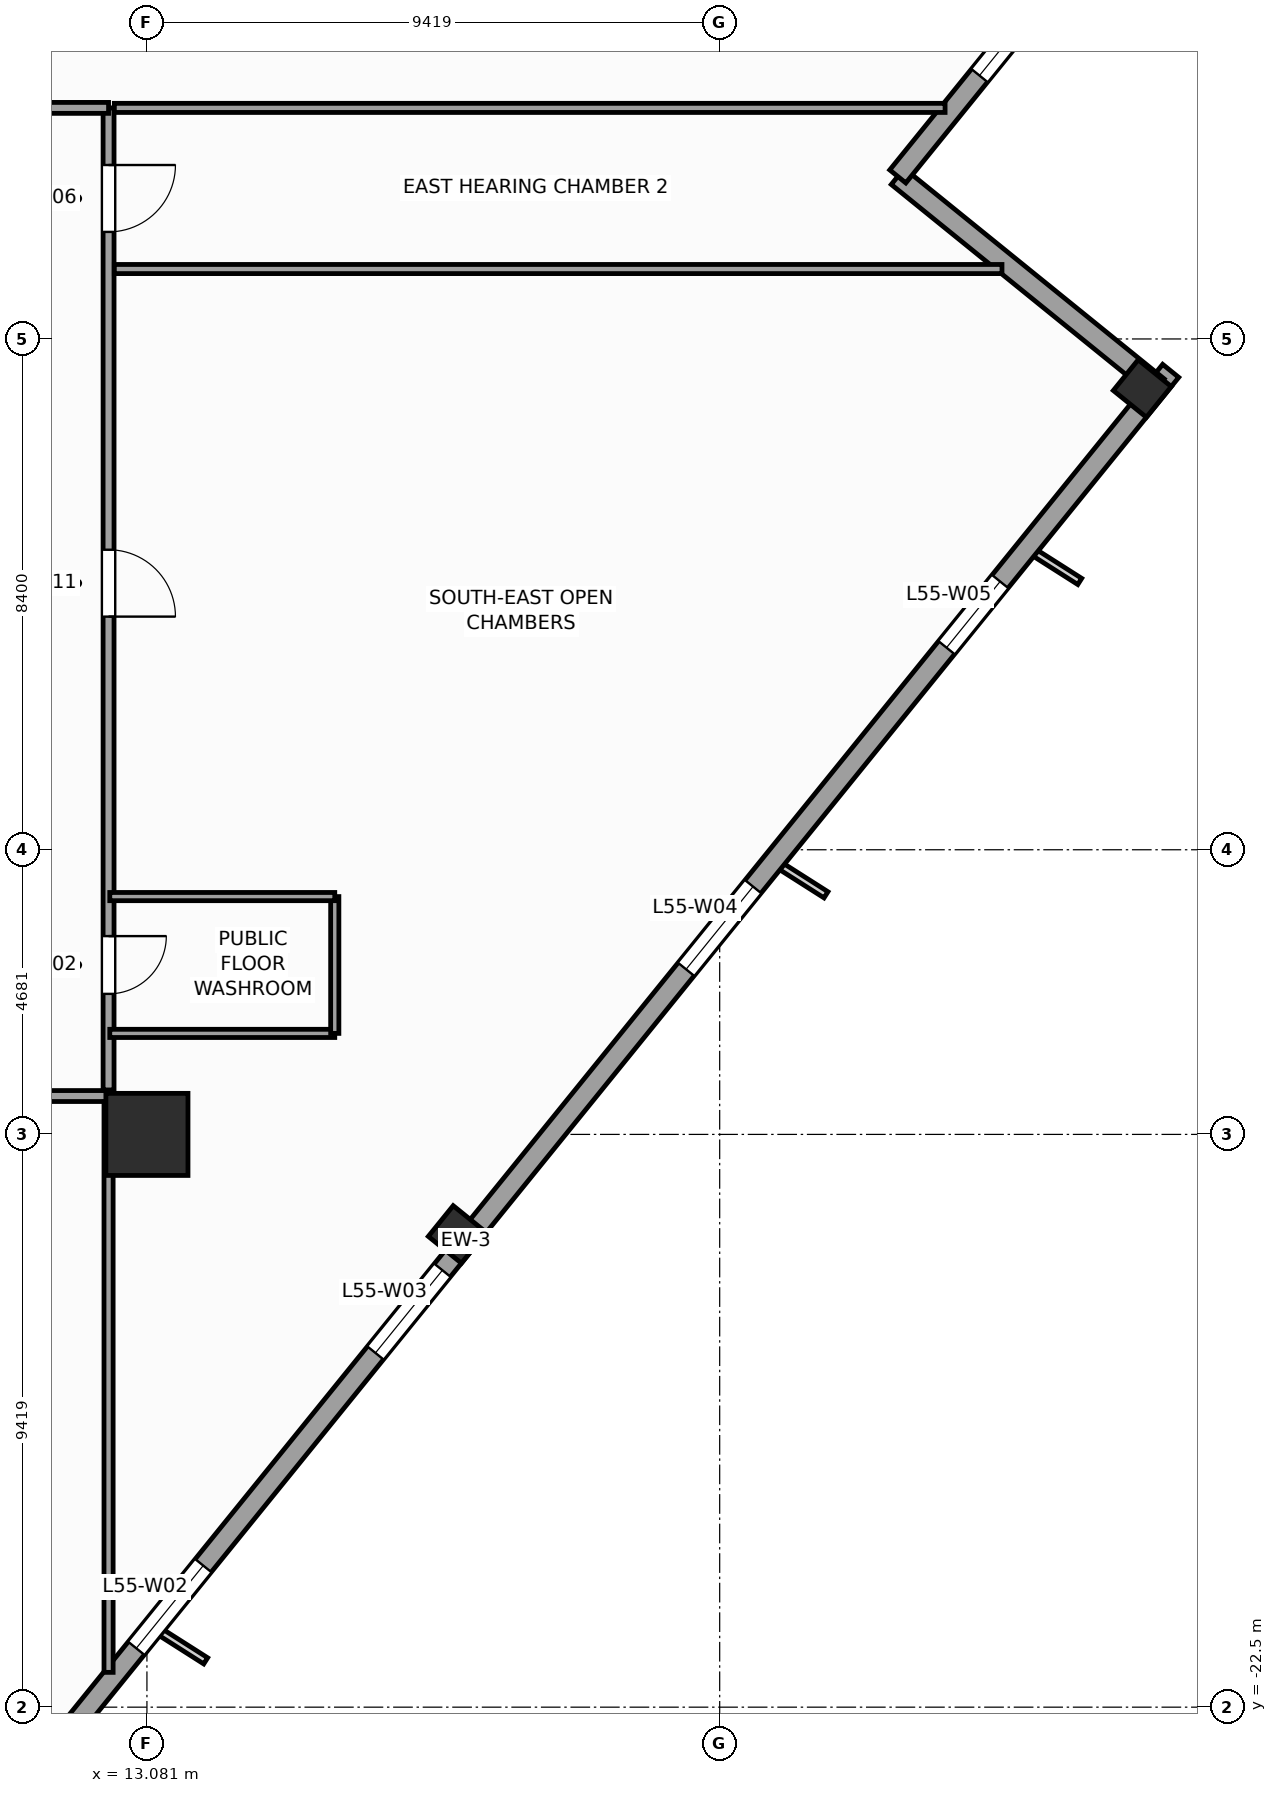
"""IFC4 building model, lengths in metres.
Left out: names, types, materials, properties, quantities, classifications, styles, units other than length and angle.
Written with IfcOpenShell. Run it as: python <this file> out.ifc"""

import sys

from ifc_helpers import new_model, si_unit, direction, frame, frame_2d, origin, origin_2d, place, context, subcontext, project, spatial, rectangle, extrude, source, transform, mapped, element, fill, save


model = new_model("IFC4")
c1 = context("Model", 3, precision=1e-05, world=origin(), true_north=direction((0.0, 1.0)))
c2 = subcontext(c1, "Body", "Model", "MODEL_VIEW")
j1 = project(units=[si_unit("LENGTHUNIT", "METRE"), si_unit("PLANEANGLEUNIT", "RADIAN")], contexts=[c1])
p1 = place(None, origin())
s1 = spatial("IfcSite", under=j1, at=p1, CompositionType="ELEMENT")
p2 = place(p1, origin())
s2 = spatial("IfcBuilding", under=s1, at=p2, CompositionType="ELEMENT")
p3 = place(p2, frame((0.0, 0.0, 229.0)))
s3 = spatial("IfcBuildingStorey", under=s2, at=p3, CompositionType="ELEMENT", Elevation=229.0)
m1 = source(origin(), c2, "Body", "SweptSolid", [
    extrude(rectangle(XDim=1.35, YDim=1.35, at=origin_2d()), origin(), (0.0, 0.0, 1.0), 3.9),
])
p4 = place(p3, frame((13.081, -13.081, 0.0), z_axis=(0.0, 0.0, 1.0), x_axis=(1.0, 0.0, 0.0)))
e1 = element("IfcColumn", 1, at=p4, inside=s3, PredefinedType="COLUMN", context=c2, shape_type="MappedRepresentation", body=[
    mapped(m1, transform((0.0, 0.0, 0.0), scale=1.0)),
])
m2 = source(origin(), c2, "Body", "SweptSolid", [
    extrude(rectangle(XDim=0.65, YDim=0.7, at=origin_2d()), origin(), (0.0, 0.0, 1.0), 3.9),
])
for number, where, z_axis, x_axis in (
    (2, (18.185, -14.726, 0.0), (0.0, 0.0, 1.0), (0.629, 0.777, 0.0)),
    (3, (29.45, -0.815, 0.0), (0.0, 0.0, 1.0), (0.629, 0.777, 0.0)),
):
    element("IfcColumn", number, at=place(p3, frame(where, z_axis=z_axis, x_axis=x_axis)), inside=s3, PredefinedType="COLUMN", context=c2, shape_type="MappedRepresentation", body=[
        mapped(m2, transform((0.0, 0.0, 0.0), scale=1.0)),
    ])
p5 = place(p3, frame((6.733, -29.154, 0.0), z_axis=(0.0, 0.0, 1.0), x_axis=(0.629325378072, 0.77714192302, 0.0)))
e4 = element("IfcWall", 4, at=p5, inside=s3, PredefinedType="STANDARD", context=c2, shape_type="SweptSolid", body=[
    extrude(rectangle(XDim=36.84, YDim=0.34, at=frame_2d((18.42, 0.0))), origin(), (0.0, 0.0, 1.0), 2.96),
])
p6 = place(p5, frame((3.721, 0.0, 0.48)))
e5 = element("IfcOpeningElement", 5, at=p6, cuts=e4, PredefinedType="OPENING", context=c2, shape_type="SweptSolid", body=[
    extrude(rectangle(XDim=1.4, YDim=2.4, at=frame_2d((0.7, 1.2))), frame((0.0, 0.18, 0.0), z_axis=(0.0, -1.0, 0.0), x_axis=(1.0, 0.0, 0.0)), (0.0, 0.0, 1.0), 0.36),
])
p7 = place(p5, frame((9.809, 0.0, 0.58)))
e6 = element("IfcOpeningElement", 6, at=p7, cuts=e4, PredefinedType="OPENING", context=c2, shape_type="SweptSolid", body=[
    extrude(rectangle(XDim=1.75, YDim=2.3, at=frame_2d((0.875, 1.15))), frame((0.0, 0.18, 0.0), z_axis=(0.0, -1.0, 0.0), x_axis=(1.0, 0.0, 0.0)), (0.0, 0.0, 1.0), 0.36),
])
p8 = place(p5, frame((16.058, 0.0, 0.58)))
e7 = element("IfcOpeningElement", 7, at=p8, cuts=e4, PredefinedType="OPENING", context=c2, shape_type="SweptSolid", body=[
    extrude(rectangle(XDim=1.75, YDim=2.3, at=frame_2d((0.875, 1.15))), frame((0.0, 0.18, 0.0), z_axis=(0.0, -1.0, 0.0), x_axis=(1.0, 0.0, 0.0)), (0.0, 0.0, 1.0), 0.36),
])
p9 = place(p5, frame((24.176, 0.0, 0.58)))
e8 = element("IfcOpeningElement", 8, at=p9, cuts=e4, PredefinedType="OPENING", context=c2, shape_type="SweptSolid", body=[
    extrude(rectangle(XDim=1.75, YDim=2.3, at=frame_2d((0.875, 1.15))), frame((0.0, 0.18, 0.0), z_axis=(0.0, -1.0, 0.0), x_axis=(1.0, 0.0, 0.0)), (0.0, 0.0, 1.0), 0.36),
])
p10 = place(p5, frame((30.982, 0.0, 0.48)))
e9 = element("IfcOpeningElement", 9, at=p10, cuts=e4, PredefinedType="OPENING", context=c2, shape_type="SweptSolid", body=[
    extrude(rectangle(XDim=1.4, YDim=2.4, at=frame_2d((0.7, 1.2))), frame((0.0, 0.18, 0.0), z_axis=(0.0, -1.0, 0.0), x_axis=(1.0, 0.0, 0.0)), (0.0, 0.0, 1.0), 0.36),
])
p11 = place(p3, frame((29.703, -0.789, 0.0), z_axis=(0.0, 0.0, 1.0), x_axis=(-0.77714355312, 0.629323365087, 0.0)))
e10 = element("IfcWall", 10, at=p11, inside=s3, PredefinedType="STANDARD", context=c2, shape_type="SweptSolid", body=[
    extrude(rectangle(XDim=5.5, YDim=0.34, at=frame_2d((2.75, 0.0))), origin(), (0.0, 0.0, 1.0), 3.66),
])
p12 = place(p3, frame((25.429, 2.673, 0.0), z_axis=(0.0, 0.0, 1.0), x_axis=(0.629299794138, 0.777162640055, 0.0)))
e11 = element("IfcWall", 11, at=p12, inside=s3, PredefinedType="STANDARD", context=c2, shape_type="SweptSolid", body=[
    extrude(rectangle(XDim=5.67, YDim=0.34, at=frame_2d((2.835, 0.0))), origin(), (0.0, 0.0, 1.0), 3.66),
])
p13 = place(p12, frame((2.135, 0.0, 0.48)))
e12 = element("IfcOpeningElement", 12, at=p13, cuts=e11, PredefinedType="OPENING", context=c2, shape_type="SweptSolid", body=[
    extrude(rectangle(XDim=1.4, YDim=2.4, at=frame_2d((0.7, 1.2))), frame((0.0, 0.18, 0.0), z_axis=(0.0, -1.0, 0.0), x_axis=(1.0, 0.0, 0.0)), (0.0, 0.0, 1.0), 0.36),
])
p14 = place(p3, frame((-12.45, -12.45, 0.0), z_axis=(0.0, 0.0, 1.0), x_axis=(1.0, 0.0, 0.0)))
e13 = element("IfcWall", 13, at=p14, inside=s3, PredefinedType="PARTITIONING", context=c2, shape_type="SweptSolid", body=[
    extrude(rectangle(XDim=24.9, YDim=0.18, at=frame_2d((12.45, 0.0))), origin(), (0.0, 0.0, 1.0), 3.66),
])
p15 = place(p14, frame((4.839, 0.0, 0.0)))
e14 = element("IfcOpeningElement", 14, at=p15, cuts=e13, PredefinedType="OPENING", context=c2, shape_type="SweptSolid", body=[
    extrude(rectangle(XDim=1.1, YDim=2.2, at=frame_2d((0.55, 1.1))), frame((0.0, 0.1, 0.0), z_axis=(0.0, -1.0, 0.0), x_axis=(1.0, 0.0, 0.0)), (0.0, 0.0, 1.0), 0.2),
])
p16 = place(p14, frame((13.15, 0.0, 0.0)))
e15 = element("IfcOpeningElement", 15, at=p16, cuts=e13, PredefinedType="OPENING", context=c2, shape_type="SweptSolid", body=[
    extrude(rectangle(XDim=1.1, YDim=2.2, at=frame_2d((0.55, 1.1))), frame((0.0, 0.1, 0.0), z_axis=(0.0, -1.0, 0.0), x_axis=(1.0, 0.0, 0.0)), (0.0, 0.0, 1.0), 0.2),
])
p17 = place(p14, frame((20.21, 0.0, 0.0)))
e16 = element("IfcOpeningElement", 16, at=p17, cuts=e13, PredefinedType="OPENING", context=c2, shape_type="SweptSolid", body=[
    extrude(rectangle(XDim=1.1, YDim=2.2, at=frame_2d((0.55, 1.1))), frame((0.0, 0.1, 0.0), z_axis=(0.0, -1.0, 0.0), x_axis=(1.0, 0.0, 0.0)), (0.0, 0.0, 1.0), 0.2),
])
p18 = place(p3, frame((12.45, -12.35, 0.0), z_axis=(0.0, 0.0, 1.0), x_axis=(0.0, 1.0, 0.0)))
e17 = element("IfcWall", 17, at=p18, inside=s3, PredefinedType="PARTITIONING", context=c2, shape_type="SweptSolid", body=[
    extrude(rectangle(XDim=16.15, YDim=0.18, at=frame_2d((8.075, 0.0))), origin(), (0.0, 0.0, 1.0), 3.66),
])
p19 = place(p18, frame((1.58, 0.0, 0.0)))
e18 = element("IfcOpeningElement", 18, at=p19, cuts=e17, PredefinedType="OPENING", context=c2, shape_type="SweptSolid", body=[
    extrude(rectangle(XDim=0.95, YDim=2.1, at=frame_2d((0.475, 1.05))), frame((0.0, 0.1, 0.0), z_axis=(0.0, -1.0, 0.0), x_axis=(1.0, 0.0, 0.0)), (0.0, 0.0, 1.0), 0.2),
])
p20 = place(p18, frame((14.111, 0.0, 0.0)))
e19 = element("IfcOpeningElement", 19, at=p20, cuts=e17, PredefinedType="OPENING", context=c2, shape_type="SweptSolid", body=[
    extrude(rectangle(XDim=1.1, YDim=2.2, at=frame_2d((0.55, 1.1))), frame((0.0, 0.1, 0.0), z_axis=(0.0, -1.0, 0.0), x_axis=(1.0, 0.0, 0.0)), (0.0, 0.0, 1.0), 0.2),
])
p21 = place(p18, frame((7.784, 0.0, 0.0)))
e20 = element("IfcOpeningElement", 20, at=p21, cuts=e17, PredefinedType="OPENING", context=c2, shape_type="SweptSolid", body=[
    extrude(rectangle(XDim=1.1, YDim=2.2, at=frame_2d((0.55, 1.1))), frame((0.0, 0.1, 0.0), z_axis=(0.0, -1.0, 0.0), x_axis=(1.0, 0.0, 0.0)), (0.0, 0.0, 1.0), 0.2),
])
p22 = place(p3, frame((8.55, 3.8, 0.0), z_axis=(0.0, 0.0, 1.0), x_axis=(1.0, 0.0, 0.0)))
e21 = element("IfcWall", 21, at=p22, inside=s3, PredefinedType="PARTITIONING", context=c2, shape_type="SweptSolid", body=[
    extrude(rectangle(XDim=3.9, YDim=0.18, at=frame_2d((1.95, 0.0))), origin(), (0.0, 0.0, 1.0), 3.66),
])
p23 = place(p22, frame((1.4, 0.0, 0.0)))
e22 = element("IfcOpeningElement", 22, at=p23, cuts=e21, PredefinedType="OPENING", context=c2, shape_type="SweptSolid", body=[
    extrude(rectangle(XDim=1.1, YDim=2.2, at=frame_2d((0.55, 1.1))), frame((0.0, 0.1, 0.0), z_axis=(0.0, -1.0, 0.0), x_axis=(1.0, 0.0, 0.0)), (0.0, 0.0, 1.0), 0.2),
])
p24 = place(p3, frame((12.545, 1.15, 0.0), z_axis=(0.0, 0.0, 1.0), x_axis=(1.0, 0.0, 0.0)))
e23 = element("IfcWall", 23, at=p24, inside=s3, PredefinedType="PARTITIONING", context=c2, shape_type="SweptSolid", body=[
    extrude(rectangle(XDim=14.597, YDim=0.15, at=frame_2d((7.299, 0.0))), origin(), (0.0, 0.0, 1.0), 3.66),
])
p25 = place(p3, frame((12.545, 3.8, 0.0), z_axis=(0.0, 0.0, 1.0), x_axis=(1.0, 0.0, 0.0)))
e24 = element("IfcWall", 24, at=p25, inside=s3, PredefinedType="PARTITIONING", context=c2, shape_type="SweptSolid", body=[
    extrude(rectangle(XDim=13.662, YDim=0.15, at=frame_2d((6.831, 0.0))), origin(), (0.0, 0.0, 1.0), 3.66),
])
p26 = place(p3, frame((12.45, -21.928, 0.0), z_axis=(0.0, 0.0, 1.0), x_axis=(0.0, 1.0, 0.0)))
e25 = element("IfcWall", 25, at=p26, inside=s3, PredefinedType="PARTITIONING", context=c2, shape_type="SweptSolid", body=[
    extrude(rectangle(XDim=9.383, YDim=0.15, at=frame_2d((4.691, 0.0))), origin(), (0.0, 0.0, 1.0), 2.96),
])
p27 = place(p3, frame((12.47, -11.42, 0.0), z_axis=(0.0, 0.0, 1.0), x_axis=(1.0, 0.0, 0.0)))
e26 = element("IfcWall", 26, at=p27, inside=s3, PredefinedType="PARTITIONING", context=c2, shape_type="SweptSolid", body=[
    extrude(rectangle(XDim=3.7, YDim=0.135, at=frame_2d((1.85, 0.0))), origin(), (0.0, 0.0, 1.0), 3.66),
])
p28 = place(p3, frame((16.17, -11.42, 0.0), z_axis=(0.0, 0.0, 1.0), x_axis=(0.0, 1.0, 0.0)))
e27 = element("IfcWall", 27, at=p28, inside=s3, PredefinedType="PARTITIONING", context=c2, shape_type="SweptSolid", body=[
    extrude(rectangle(XDim=2.25, YDim=0.135, at=frame_2d((1.125, 0.0))), origin(), (0.0, 0.0, 1.0), 3.66),
])
p29 = place(p3, frame((12.47, -9.17, 0.0), z_axis=(0.0, 0.0, 1.0), x_axis=(1.0, 0.0, 0.0)))
e28 = element("IfcWall", 28, at=p29, inside=s3, PredefinedType="PARTITIONING", context=c2, shape_type="SweptSolid", body=[
    extrude(rectangle(XDim=3.7, YDim=0.135, at=frame_2d((1.85, 0.0))), origin(), (0.0, 0.0, 1.0), 3.66),
])
m3 = source(origin(), c2, "Body", "SweptSolid", [
    extrude(rectangle(XDim=1.75, YDim=2.3, at=frame_2d((0.875, 1.15))), frame((0.0, 0.03, 0.0), z_axis=(0.0, -1.0, 0.0), x_axis=(1.0, 0.0, 0.0)), (0.0, 0.0, 1.0), 0.06),
])
p30 = place(p7, origin())
e29 = element("IfcWindow", 29, at=p30, inside=s3, PartitioningType="SINGLE_PANEL", PredefinedType="WINDOW", context=c2, shape_type="MappedRepresentation", body=[
    mapped(m3, transform((0.0, 0.0, 0.0), scale=1.0)),
])
fill(e6, e29)
p31 = place(p8, origin())
e30 = element("IfcWindow", 30, at=p31, inside=s3, PartitioningType="SINGLE_PANEL", PredefinedType="WINDOW", context=c2, shape_type="MappedRepresentation", body=[
    mapped(m3, transform((0.0, 0.0, 0.0), scale=1.0)),
])
fill(e7, e30)
p32 = place(p9, origin())
e31 = element("IfcWindow", 31, at=p32, inside=s3, PartitioningType="SINGLE_PANEL", PredefinedType="WINDOW", context=c2, shape_type="MappedRepresentation", body=[
    mapped(m3, transform((0.0, 0.0, 0.0), scale=1.0)),
])
fill(e8, e31)
m4 = source(origin(), c2, "Body", "SweptSolid", [
    extrude(rectangle(XDim=1.4, YDim=2.4, at=frame_2d((0.7, 1.2))), frame((0.0, 0.03, 0.0), z_axis=(0.0, -1.0, 0.0), x_axis=(1.0, 0.0, 0.0)), (0.0, 0.0, 1.0), 0.06),
])
p33 = place(p10, origin())
e32 = element("IfcWindow", 32, at=p33, inside=s3, PartitioningType="SINGLE_PANEL", PredefinedType="WINDOW", context=c2, shape_type="MappedRepresentation", body=[
    mapped(m4, transform((0.0, 0.0, 0.0), scale=1.0)),
])
fill(e9, e32)
p34 = place(p13, origin())
e33 = element("IfcWindow", 33, at=p34, inside=s3, PartitioningType="SINGLE_PANEL", PredefinedType="WINDOW", context=c2, shape_type="MappedRepresentation", body=[
    mapped(m4, transform((0.0, 0.0, 0.0), scale=1.0)),
])
fill(e12, e33)
m5 = source(origin(), c2, "Body", "SweptSolid", [
    extrude(rectangle(XDim=0.95, YDim=2.1, at=frame_2d((0.475, 1.05))), frame((0.0, 0.025, 0.0), z_axis=(0.0, -1.0, 0.0), x_axis=(1.0, 0.0, 0.0)), (0.0, 0.0, 1.0), 0.05),
])
p35 = place(p19, frame((0.95, 0.0, 0.0), z_axis=(0.0, 0.0, 1.0), x_axis=(-1.0, 0.0, 0.0)))
e34 = element("IfcDoor", 34, at=p35, inside=s3, OperationType="SINGLE_SWING_RIGHT", PredefinedType="DOOR", context=c2, shape_type="MappedRepresentation", body=[
    mapped(m5, transform((0.0, 0.0, 0.0), scale=1.0)),
])
fill(e18, e34)
m6 = source(origin(), c2, "Body", "SweptSolid", [
    extrude(rectangle(XDim=1.1, YDim=2.2, at=frame_2d((0.55, 1.1))), frame((0.0, 0.025, 0.0), z_axis=(0.0, -1.0, 0.0), x_axis=(1.0, 0.0, 0.0)), (0.0, 0.0, 1.0), 0.05),
])
p36 = place(p20, frame((1.1, 0.0, 0.0), z_axis=(0.0, 0.0, 1.0), x_axis=(-1.0, 0.0, 0.0)))
e35 = element("IfcDoor", 35, at=p36, inside=s3, OperationType="SINGLE_SWING_RIGHT", PredefinedType="DOOR", context=c2, shape_type="MappedRepresentation", body=[
    mapped(m6, transform((0.0, 0.0, 0.0), scale=1.0)),
])
fill(e19, e35)
p37 = place(p21, frame((1.1, 0.0, 0.0), z_axis=(0.0, 0.0, 1.0), x_axis=(-1.0, 0.0, 0.0)))
e36 = element("IfcDoor", 36, at=p37, inside=s3, OperationType="SINGLE_SWING_LEFT", PredefinedType="DOOR", context=c2, shape_type="MappedRepresentation", body=[
    mapped(m6, transform((0.0, 0.0, 0.0), scale=1.0)),
])
fill(e20, e36)
save(model, sys.argv[1])
